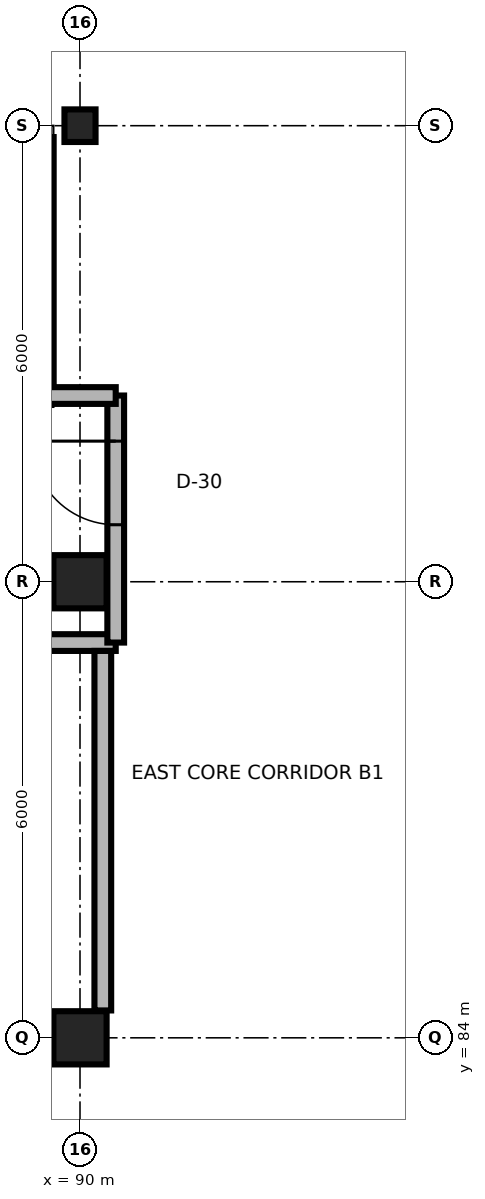
"""IFC4 building model, lengths in metres.
Left out: names, types, materials, properties, quantities, classifications, styles, units other than length and angle.
Written with IfcOpenShell. Run it as: python <this file> out.ifc"""

import sys

from ifc_helpers import new_model, si_unit, direction, frame, frame_2d, origin, origin_2d, place, context, subcontext, project, spatial, rectangle, i_section, extrude, element, fill, save


model = new_model("IFC4")
c1 = context("Model", 3, precision=1e-05, world=origin(), true_north=direction((0.0, 1.0)))
c2 = subcontext(c1, "Body", "Model", "MODEL_VIEW")
j1 = project(units=[si_unit("LENGTHUNIT", "METRE"), si_unit("PLANEANGLEUNIT", "RADIAN")], contexts=[c1])
p1 = place(None, origin())
s1 = spatial("IfcSite", under=j1, at=p1, CompositionType="ELEMENT")
p2 = place(p1, origin())
s2 = spatial("IfcBuilding", under=s1, at=p2, CompositionType="ELEMENT")
p3 = place(p2, frame((0.0, 0.0, -4.8)))
s3 = spatial("IfcBuildingStorey", under=s2, at=p3, CompositionType="ELEMENT", Elevation=-4.8)
for number, where, z_axis, x_axis in (
    (1, (90.0, 84.0, 0.0), (0.0, 0.0, 1.0), (1.0, 0.0, 0.0)),
    (2, (90.0, 90.0, 0.0), (0.0, 0.0, 1.0), (1.0, 0.0, 0.0)),
):
    element("IfcColumn", number, at=place(p3, frame(where, z_axis=z_axis, x_axis=x_axis)), inside=s3, PredefinedType="COLUMN", context=c2, shape_type="SweptSolid", body=[
        extrude(rectangle(XDim=0.7, YDim=0.7, at=origin_2d()), origin(), (0.0, 0.0, 1.0), 4.8),
    ])
p4 = place(p3, frame((90.0, 96.0, 0.0), z_axis=(0.0, 0.0, 1.0), x_axis=(1.0, 0.0, 0.0)))
e3 = element("IfcColumn", 3, at=p4, inside=s3, PredefinedType="COLUMN", context=c2, shape_type="SweptSolid", body=[
    extrude(i_section(OverallWidth=0.409, OverallDepth=0.429, WebThickness=0.024, FlangeThickness=0.035, FilletRadius=0.022, at=origin_2d()), origin(), (0.0, 0.0, 1.0), 4.8),
])
p5 = place(p3, frame((89.5, 92.45, -1.6), z_axis=(0.0, 0.0, 1.0), x_axis=(0.0, 1.0, 0.0)))
e4 = element("IfcWall", 4, at=p5, inside=s3, PredefinedType="SHEAR", context=c2, shape_type="SweptSolid", body=[
    extrude(rectangle(XDim=3.4, YDim=0.3, at=frame_2d((1.7, 0.0))), origin(), (0.0, 0.0, 1.0), 1.6),
])
p6 = place(p3, frame((89.5, 92.45, 0.0), z_axis=(0.0, 0.0, 1.0), x_axis=(0.0, 1.0, 0.0)))
e5 = element("IfcWall", 5, at=p6, inside=s3, PredefinedType="SHEAR", context=c2, shape_type="SweptSolid", body=[
    extrude(rectangle(XDim=3.4, YDim=0.3, at=frame_2d((1.7, 0.0))), origin(), (0.0, 0.0, 1.0), 4.48),
])
p7 = place(p3, frame((87.8, 84.0, 0.0), z_axis=(0.0, 0.0, 1.0), x_axis=(1.0, 0.0, 0.0)))
e6 = element("IfcWall", 6, at=p7, inside=s3, PredefinedType="PARTITIONING", context=c2, shape_type="SweptSolid", body=[
    extrude(rectangle(XDim=2.5, YDim=0.22, at=frame_2d((1.25, 0.0))), origin(), (0.0, 0.0, 1.0), 4.04),
])
p8 = place(p7, frame((0.75, 0.0, 0.0)))
e7 = element("IfcOpeningElement", 7, at=p8, cuts=e6, PredefinedType="OPENING", context=c2, shape_type="SweptSolid", body=[
    extrude(rectangle(XDim=1.0, YDim=2.15, at=frame_2d((0.5, 1.075))), frame((0.0, 0.125, 0.0), z_axis=(0.0, -1.0, 0.0), x_axis=(1.0, 0.0, 0.0)), (0.0, 0.0, 1.0), 0.25),
])
p9 = place(p3, frame((80.6, 89.2, 0.0), z_axis=(0.0, 0.0, 1.0), x_axis=(1.0, 0.0, 0.0)))
e8 = element("IfcWall", 8, at=p9, inside=s3, PredefinedType="PARTITIONING", context=c2, shape_type="SweptSolid", body=[
    extrude(rectangle(XDim=9.87, YDim=0.22, at=frame_2d((4.935, 0.0))), origin(), (0.0, 0.0, 1.0), 4.48),
])
p10 = place(p3, frame((90.47, 89.2, 0.0), z_axis=(0.0, 0.0, 1.0), x_axis=(0.0, 1.0, 0.0)))
e9 = element("IfcWall", 9, at=p10, inside=s3, PredefinedType="PARTITIONING", context=c2, shape_type="SweptSolid", body=[
    extrude(rectangle(XDim=3.25, YDim=0.22, at=frame_2d((1.625, 0.0))), origin(), (0.0, 0.0, 1.0), 4.48),
])
p11 = place(p10, frame((1.55, 0.0, 0.0)))
e10 = element("IfcOpeningElement", 10, at=p11, cuts=e9, PredefinedType="OPENING", context=c2, shape_type="SweptSolid", body=[
    extrude(rectangle(XDim=1.1, YDim=2.15, at=frame_2d((0.55, 1.075))), frame((0.0, 0.125, 0.0), z_axis=(0.0, -1.0, 0.0), x_axis=(1.0, 0.0, 0.0)), (0.0, 0.0, 1.0), 0.25),
])
p12 = place(p3, frame((90.3, 84.36, 0.0), z_axis=(0.0, 0.0, 1.0), x_axis=(0.0, 1.0, 0.0)))
e11 = element("IfcWall", 11, at=p12, inside=s3, PredefinedType="PARTITIONING", context=c2, shape_type="SweptSolid", body=[
    extrude(rectangle(XDim=4.73, YDim=0.22, at=frame_2d((2.365, 0.0))), origin(), (0.0, 0.0, 1.0), 4.48),
])
p13 = place(p3, frame((89.5, 92.45, 0.0), z_axis=(0.0, 0.0, 1.0), x_axis=(1.0, 0.0, 0.0)))
e12 = element("IfcWall", 12, at=p13, inside=s3, PredefinedType="PARTITIONING", context=c2, shape_type="SweptSolid", body=[
    extrude(rectangle(XDim=0.97, YDim=0.22, at=frame_2d((0.485, 0.0))), origin(), (0.0, 0.0, 1.0), 4.48),
])
p14 = place(p11, origin())
e13 = element("IfcDoor", 13, at=p14, inside=s3, OperationType="SINGLE_SWING_RIGHT", PredefinedType="DOOR", context=c2, shape_type="SweptSolid", body=[
    extrude(rectangle(XDim=1.1, YDim=2.15, at=frame_2d((0.55, 1.075))), frame((0.0, 0.025, 0.0), z_axis=(0.0, -1.0, 0.0), x_axis=(1.0, 0.0, 0.0)), (0.0, 0.0, 1.0), 0.05),
])
fill(e10, e13)
save(model, sys.argv[1])
